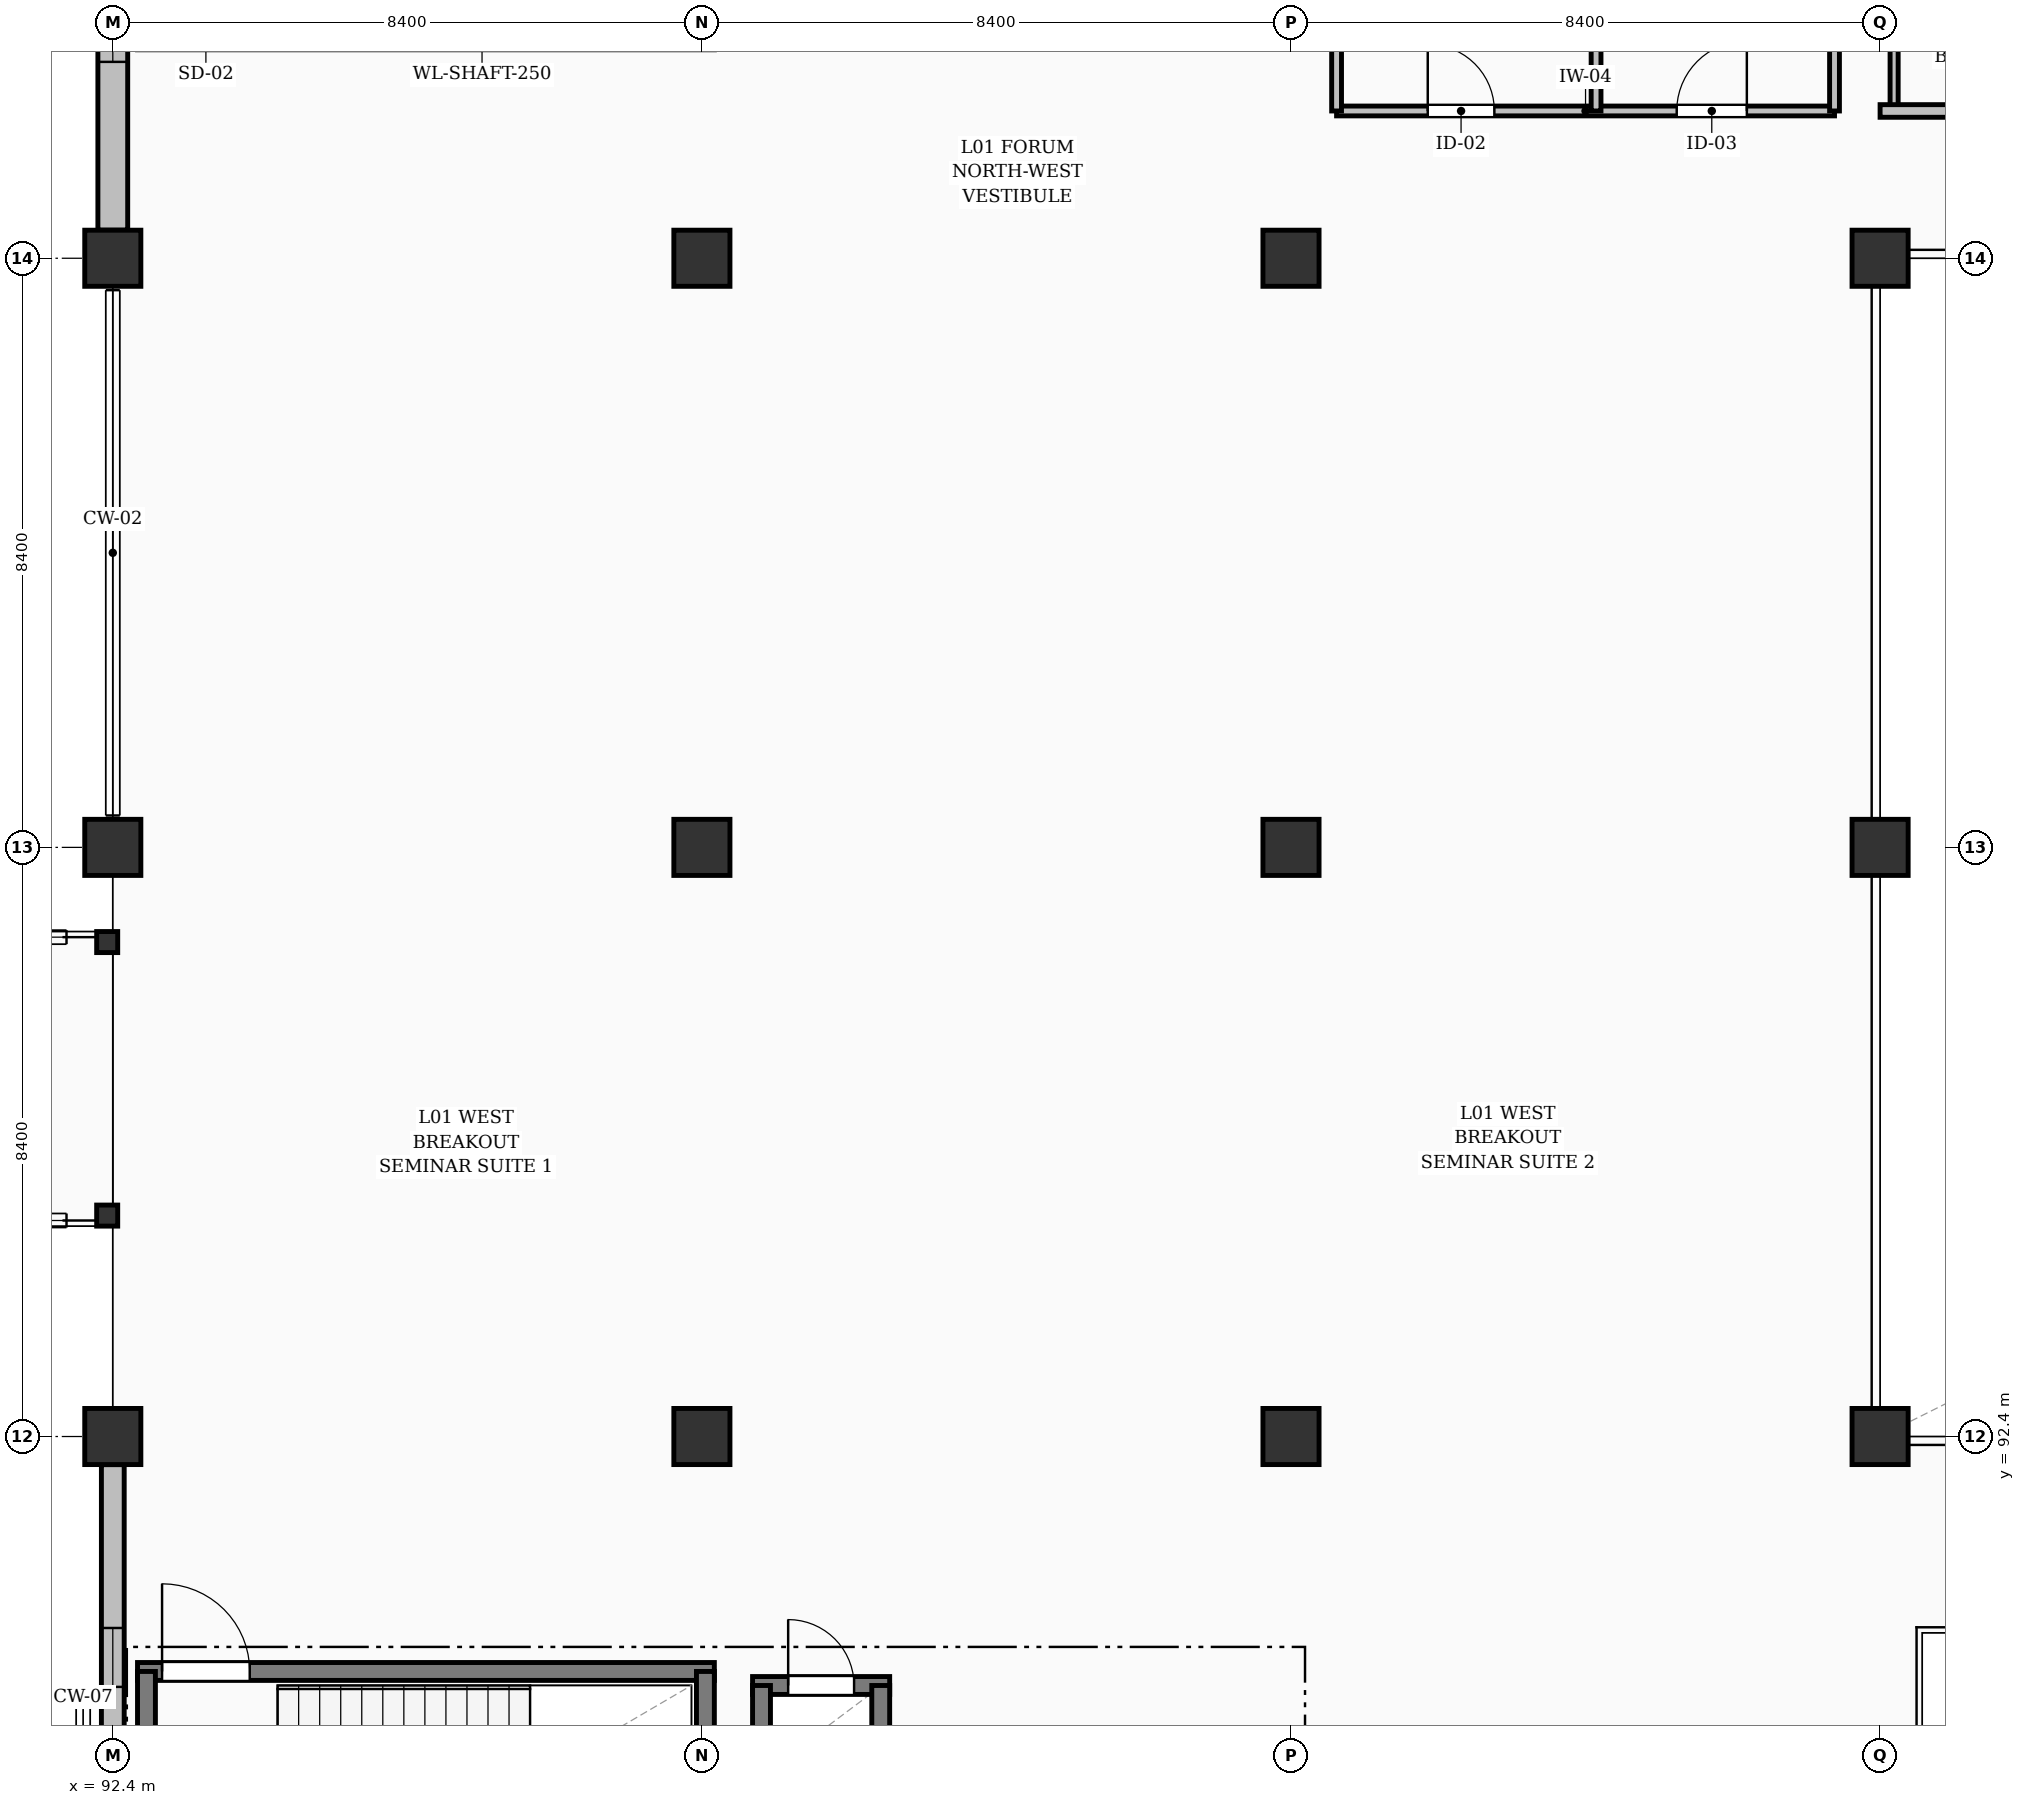
"""IFC4 building model, lengths in metres.
Left out: names, types, materials, properties, quantities, classifications, styles, units other than length and angle.
Written with IfcOpenShell. Run it as: python <this file> out.ifc"""

import sys

from ifc_helpers import new_model, si_unit, direction, frame, frame_2d, origin, origin_2d, place, context, subcontext, project, spatial, rectangle, hollow_rectangle, extrude, element, fill, save


model = new_model("IFC4")
c1 = context("Model", 3, precision=1e-05, world=origin(), true_north=direction((0.0, 1.0)))
c2 = subcontext(c1, "Body", "Model", "MODEL_VIEW")
j1 = project(units=[si_unit("LENGTHUNIT", "METRE"), si_unit("PLANEANGLEUNIT", "RADIAN")], contexts=[c1])
p1 = place(None, origin())
s1 = spatial("IfcSite", under=j1, at=p1, CompositionType="ELEMENT")
p2 = place(p1, origin())
s2 = spatial("IfcBuilding", under=s1, at=p2, CompositionType="ELEMENT")
p3 = place(p2, frame((0.0, 0.0, 3.92)))
s3 = spatial("IfcBuildingStorey", under=s2, at=p3, CompositionType="ELEMENT", Elevation=3.92)
for number, where, z_axis, x_axis in (
    (1, (92.4, 92.4, 0.0), (0.0, 0.0, 1.0), (1.0, 0.0, 0.0)),
    (2, (92.4, 100.8, 0.0), (0.0, 0.0, 1.0), (1.0, 0.0, 0.0)),
    (3, (92.4, 109.2, 0.0), (0.0, 0.0, 1.0), (1.0, 0.0, 0.0)),
    (4, (100.8, 92.4, 0.0), (0.0, 0.0, 1.0), (1.0, 0.0, 0.0)),
    (5, (100.8, 100.8, 0.0), (0.0, 0.0, 1.0), (1.0, 0.0, 0.0)),
    (6, (100.8, 109.2, 0.0), (0.0, 0.0, 1.0), (1.0, 0.0, 0.0)),
    (7, (109.2, 92.4, 0.0), (0.0, 0.0, 1.0), (1.0, 0.0, 0.0)),
    (8, (109.2, 100.8, 0.0), (0.0, 0.0, 1.0), (1.0, 0.0, 0.0)),
    (9, (109.2, 109.2, 0.0), (0.0, 0.0, 1.0), (1.0, 0.0, 0.0)),
    (10, (117.6, 92.4, 0.0), (0.0, 0.0, 1.0), (1.0, 0.0, 0.0)),
    (11, (117.6, 100.8, 0.0), (0.0, 0.0, 1.0), (1.0, 0.0, 0.0)),
    (12, (117.6, 109.2, 0.0), (0.0, 0.0, 1.0), (1.0, 0.0, 0.0)),
):
    element("IfcColumn", number, at=place(p3, frame(where, z_axis=z_axis, x_axis=x_axis)), inside=s3, PredefinedType="COLUMN", context=c2, shape_type="SweptSolid", body=[
        extrude(rectangle(XDim=0.8, YDim=0.8, at=origin_2d()), origin(), (0.0, 0.0, 1.0), 3.64),
    ])
for number, where, z_axis, x_axis in (
    (13, (92.32, 95.55, 0.0), (0.0, 0.0, 1.0), (1.0, 0.0, 0.0)),
    (14, (92.32, 99.45, 0.0), (0.0, 0.0, 1.0), (1.0, 0.0, 0.0)),
):
    element("IfcColumn", number, at=place(p3, frame(where, z_axis=z_axis, x_axis=x_axis)), inside=s3, PredefinedType="COLUMN", context=c2, shape_type="SweptSolid", body=[
        extrude(hollow_rectangle(XDim=0.3, YDim=0.3, WallThickness=0.016, at=origin_2d()), origin(), (0.0, 0.0, 1.0), 3.64),
    ])
p4 = place(p3, frame((92.4, 84.401, 0.0), z_axis=(0.0, 0.0, 1.0), x_axis=(0.0, 1.0, 0.0)))
e15 = element("IfcWall", 15, at=p4, inside=s3, PredefinedType="SOLIDWALL", context=c2, shape_type="SweptSolid", body=[
    extrude(rectangle(XDim=7.598, YDim=0.325, at=frame_2d((3.799, 0.0))), origin(), (0.0, 0.0, 1.0), 2.695),
])
p5 = place(p4, frame((2.329, 0.0, 0.3)))
e16 = element("IfcOpeningElement", 16, at=p5, cuts=e15, PredefinedType="OPENING", context=c2, shape_type="SweptSolid", body=[
    extrude(rectangle(XDim=0.84, YDim=1.85, at=frame_2d((0.42, 0.925))), frame((0.0, 0.172, 0.0), z_axis=(0.0, -1.0, 0.0), x_axis=(1.0, 0.0, 0.0)), (0.0, 0.0, 1.0), 0.345),
])
p6 = place(p4, frame((4.429, 0.0, 0.3)))
e17 = element("IfcOpeningElement", 17, at=p6, cuts=e15, PredefinedType="OPENING", context=c2, shape_type="SweptSolid", body=[
    extrude(rectangle(XDim=0.84, YDim=1.85, at=frame_2d((0.42, 0.925))), frame((0.0, 0.172, 0.0), z_axis=(0.0, -1.0, 0.0), x_axis=(1.0, 0.0, 0.0)), (0.0, 0.0, 1.0), 0.345),
])
p7 = place(p3, frame((92.4, 109.601, 0.0), z_axis=(0.0, 0.0, 1.0), x_axis=(0.0, 1.0, 0.0)))
e18 = element("IfcWall", 18, at=p7, inside=s3, PredefinedType="SOLIDWALL", context=c2, shape_type="SweptSolid", body=[
    extrude(rectangle(XDim=7.598, YDim=0.425, at=frame_2d((3.799, 0.0))), origin(), (0.0, 0.0, 1.0), 2.495),
])
p8 = place(p7, frame((2.399, 0.0, 0.3)))
e19 = element("IfcOpeningElement", 19, at=p8, cuts=e18, PredefinedType="OPENING", context=c2, shape_type="SweptSolid", body=[
    extrude(rectangle(XDim=0.7, YDim=1.9, at=frame_2d((0.35, 0.95))), frame((0.0, 0.223, 0.0), z_axis=(0.0, -1.0, 0.0), x_axis=(1.0, 0.0, 0.0)), (0.0, 0.0, 1.0), 0.445),
])
p9 = place(p7, frame((4.499, 0.0, 0.3)))
e20 = element("IfcOpeningElement", 20, at=p9, cuts=e18, PredefinedType="OPENING", context=c2, shape_type="SweptSolid", body=[
    extrude(rectangle(XDim=0.7, YDim=1.9, at=frame_2d((0.35, 0.95))), frame((0.0, 0.223, 0.0), z_axis=(0.0, -1.0, 0.0), x_axis=(1.0, 0.0, 0.0)), (0.0, 0.0, 1.0), 0.445),
])
p10 = place(p3, frame((92.752, 89.05, 0.0), z_axis=(0.0, 0.0, 1.0), x_axis=(1.0, 0.0, 0.0)))
e21 = element("IfcWall", 21, at=p10, inside=s3, PredefinedType="SOLIDWALL", context=c2, shape_type="SweptSolid", body=[
    extrude(rectangle(XDim=8.225, YDim=0.255, at=frame_2d((4.113, 0.0))), origin(), (0.0, 0.0, 1.0), 3.36),
])
p11 = place(p10, frame((0.35, 0.0, 0.0)))
e22 = element("IfcOpeningElement", 22, at=p11, cuts=e21, PredefinedType="OPENING", context=c2, shape_type="SweptSolid", body=[
    extrude(rectangle(XDim=1.25, YDim=2.2, at=frame_2d((0.625, 1.1))), frame((0.0, 0.137, 0.0), z_axis=(0.0, -1.0, 0.0), x_axis=(1.0, 0.0, 0.0)), (0.0, 0.0, 1.0), 0.275),
])
for number, where, z_axis, x_axis in (
    (23, (92.88, 85.18, 0.0), (0.0, 0.0, 1.0), (0.0, 1.0, 0.0)),
    (24, (100.85, 85.18, 0.0), (0.0, 0.0, 1.0), (0.0, 1.0, 0.0)),
):
    element("IfcWall", number, at=place(p3, frame(where, z_axis=z_axis, x_axis=x_axis)), inside=s3, PredefinedType="SOLIDWALL", context=c2, shape_type="SweptSolid", body=[
        extrude(rectangle(XDim=3.87, YDim=0.255, at=frame_2d((1.935, 0.0))), origin(), (0.0, 0.0, 1.0), 3.36),
    ])
p12 = place(p3, frame((101.522, 88.85, 0.0), z_axis=(0.0, 0.0, 1.0), x_axis=(1.0, 0.0, 0.0)))
e25 = element("IfcWall", 25, at=p12, inside=s3, PredefinedType="SOLIDWALL", context=c2, shape_type="SweptSolid", body=[
    extrude(rectangle(XDim=1.955, YDim=0.255, at=frame_2d((0.978, 0.0))), origin(), (0.0, 0.0, 1.0), 3.36),
])
p13 = place(p12, frame((0.508, 0.0, 0.0)))
e26 = element("IfcOpeningElement", 26, at=p13, cuts=e25, PredefinedType="OPENING", context=c2, shape_type="SweptSolid", body=[
    extrude(rectangle(XDim=0.94, YDim=2.1, at=frame_2d((0.47, 1.05))), frame((0.0, 0.137, 0.0), z_axis=(0.0, -1.0, 0.0), x_axis=(1.0, 0.0, 0.0)), (0.0, 0.0, 1.0), 0.275),
])
for number, where, z_axis, x_axis in (
    (27, (101.65, 87.55, 0.0), (0.0, 0.0, 1.0), (0.0, 1.0, 0.0)),
    (28, (103.35, 87.55, 0.0), (0.0, 0.0, 1.0), (0.0, 1.0, 0.0)),
):
    element("IfcWall", number, at=place(p3, frame(where, z_axis=z_axis, x_axis=x_axis)), inside=s3, PredefinedType="SOLIDWALL", context=c2, shape_type="SweptSolid", body=[
        extrude(rectangle(XDim=1.3, YDim=0.255, at=frame_2d((0.65, 0.0))), origin(), (0.0, 0.0, 1.0), 3.36),
    ])
p14 = place(p3, frame((109.85, 111.3, 0.0), z_axis=(0.0, 0.0, 1.0), x_axis=(1.0, 0.0, 0.0)))
e29 = element("IfcWall", 29, at=p14, inside=s3, PredefinedType="PARTITIONING", context=c2, shape_type="SweptSolid", body=[
    extrude(rectangle(XDim=7.1, YDim=0.14, at=frame_2d((3.55, 0.0))), origin(), (0.0, 0.0, 1.0), 3.36),
])
p15 = place(p14, frame((1.3, 0.0, 0.0)))
e30 = element("IfcOpeningElement", 30, at=p15, cuts=e29, PredefinedType="OPENING", context=c2, shape_type="SweptSolid", body=[
    extrude(rectangle(XDim=0.95, YDim=2.1, at=frame_2d((0.475, 1.05))), frame((0.0, 0.08, 0.0), z_axis=(0.0, -1.0, 0.0), x_axis=(1.0, 0.0, 0.0)), (0.0, 0.0, 1.0), 0.16),
])
p16 = place(p14, frame((4.85, 0.0, 0.0)))
e31 = element("IfcOpeningElement", 31, at=p16, cuts=e29, PredefinedType="OPENING", context=c2, shape_type="SweptSolid", body=[
    extrude(rectangle(XDim=1.0, YDim=2.1, at=frame_2d((0.5, 1.05))), frame((0.0, 0.08, 0.0), z_axis=(0.0, -1.0, 0.0), x_axis=(1.0, 0.0, 0.0)), (0.0, 0.0, 1.0), 0.16),
])
for number, where, z_axis, x_axis in (
    (32, (109.85, 111.3, 0.0), (0.0, 0.0, 1.0), (0.0, 1.0, 0.0)),
    (33, (113.55, 111.3, 0.0), (0.0, 0.0, 1.0), (0.0, 1.0, 0.0)),
    (34, (116.95, 111.3, 0.0), (0.0, 0.0, 1.0), (0.0, 1.0, 0.0)),
):
    element("IfcWall", number, at=place(p3, frame(where, z_axis=z_axis, x_axis=x_axis)), inside=s3, PredefinedType="PARTITIONING", context=c2, shape_type="SweptSolid", body=[
        extrude(rectangle(XDim=6.11, YDim=0.14, at=frame_2d((3.055, 0.0))), origin(), (0.0, 0.0, 1.0), 3.36),
    ])
p17 = place(p3, frame((117.8, 111.3, 0.0), z_axis=(0.0, 0.0, 1.0), x_axis=(0.0, 1.0, 0.0)))
e35 = element("IfcWall", 35, at=p17, inside=s3, PredefinedType="PARTITIONING", context=c2, shape_type="SweptSolid", body=[
    extrude(rectangle(XDim=2.15, YDim=0.115, at=frame_2d((1.075, 0.0))), origin(), (0.0, 0.0, 1.0), 2.595),
])
p18 = place(p3, frame((117.6, 111.3, 0.0), z_axis=(0.0, 0.0, 1.0), x_axis=(1.0, 0.0, 0.0)))
e36 = element("IfcWall", 36, at=p18, inside=s3, PredefinedType="PARTITIONING", context=c2, shape_type="SweptSolid", body=[
    extrude(rectangle(XDim=50.32, YDim=0.18, at=frame_2d((25.16, 0.0))), origin(), (0.0, 0.0, 1.0), 3.36),
])
p19 = place(p18, frame((2.45, 0.0, 0.0)))
e37 = element("IfcOpeningElement", 37, at=p19, cuts=e36, PredefinedType="OPENING", context=c2, shape_type="SweptSolid", body=[
    extrude(rectangle(XDim=0.96, YDim=2.15, at=frame_2d((0.48, 1.075))), frame((0.0, 0.1, 0.0), z_axis=(0.0, -1.0, 0.0), x_axis=(1.0, 0.0, 0.0)), (0.0, 0.0, 1.0), 0.2),
])
p20 = place(p18, frame((6.57, 0.0, 0.0)))
e38 = element("IfcOpeningElement", 38, at=p20, cuts=e36, PredefinedType="OPENING", context=c2, shape_type="SweptSolid", body=[
    extrude(rectangle(XDim=0.96, YDim=2.15, at=frame_2d((0.48, 1.075))), frame((0.0, 0.1, 0.0), z_axis=(0.0, -1.0, 0.0), x_axis=(1.0, 0.0, 0.0)), (0.0, 0.0, 1.0), 0.2),
])
p21 = place(p18, frame((10.69, 0.0, 0.0)))
e39 = element("IfcOpeningElement", 39, at=p21, cuts=e36, PredefinedType="OPENING", context=c2, shape_type="SweptSolid", body=[
    extrude(rectangle(XDim=0.96, YDim=2.15, at=frame_2d((0.48, 1.075))), frame((0.0, 0.1, 0.0), z_axis=(0.0, -1.0, 0.0), x_axis=(1.0, 0.0, 0.0)), (0.0, 0.0, 1.0), 0.2),
])
p22 = place(p18, frame((14.81, 0.0, 0.0)))
e40 = element("IfcOpeningElement", 40, at=p22, cuts=e36, PredefinedType="OPENING", context=c2, shape_type="SweptSolid", body=[
    extrude(rectangle(XDim=0.96, YDim=2.15, at=frame_2d((0.48, 1.075))), frame((0.0, 0.1, 0.0), z_axis=(0.0, -1.0, 0.0), x_axis=(1.0, 0.0, 0.0)), (0.0, 0.0, 1.0), 0.2),
])
p23 = place(p18, frame((18.93, 0.0, 0.0)))
e41 = element("IfcOpeningElement", 41, at=p23, cuts=e36, PredefinedType="OPENING", context=c2, shape_type="SweptSolid", body=[
    extrude(rectangle(XDim=0.96, YDim=2.15, at=frame_2d((0.48, 1.075))), frame((0.0, 0.1, 0.0), z_axis=(0.0, -1.0, 0.0), x_axis=(1.0, 0.0, 0.0)), (0.0, 0.0, 1.0), 0.2),
])
p24 = place(p18, frame((23.05, 0.0, 0.0)))
e42 = element("IfcOpeningElement", 42, at=p24, cuts=e36, PredefinedType="OPENING", context=c2, shape_type="SweptSolid", body=[
    extrude(rectangle(XDim=0.96, YDim=2.15, at=frame_2d((0.48, 1.075))), frame((0.0, 0.1, 0.0), z_axis=(0.0, -1.0, 0.0), x_axis=(1.0, 0.0, 0.0)), (0.0, 0.0, 1.0), 0.2),
])
p25 = place(p18, frame((27.17, 0.0, 0.0)))
e43 = element("IfcOpeningElement", 43, at=p25, cuts=e36, PredefinedType="OPENING", context=c2, shape_type="SweptSolid", body=[
    extrude(rectangle(XDim=0.96, YDim=2.15, at=frame_2d((0.48, 1.075))), frame((0.0, 0.1, 0.0), z_axis=(0.0, -1.0, 0.0), x_axis=(1.0, 0.0, 0.0)), (0.0, 0.0, 1.0), 0.2),
])
p26 = place(p18, frame((31.29, 0.0, 0.0)))
e44 = element("IfcOpeningElement", 44, at=p26, cuts=e36, PredefinedType="OPENING", context=c2, shape_type="SweptSolid", body=[
    extrude(rectangle(XDim=0.96, YDim=2.15, at=frame_2d((0.48, 1.075))), frame((0.0, 0.1, 0.0), z_axis=(0.0, -1.0, 0.0), x_axis=(1.0, 0.0, 0.0)), (0.0, 0.0, 1.0), 0.2),
])
p27 = place(p18, frame((35.41, 0.0, 0.0)))
e45 = element("IfcOpeningElement", 45, at=p27, cuts=e36, PredefinedType="OPENING", context=c2, shape_type="SweptSolid", body=[
    extrude(rectangle(XDim=0.96, YDim=2.15, at=frame_2d((0.48, 1.075))), frame((0.0, 0.1, 0.0), z_axis=(0.0, -1.0, 0.0), x_axis=(1.0, 0.0, 0.0)), (0.0, 0.0, 1.0), 0.2),
])
p28 = place(p18, frame((39.53, 0.0, 0.0)))
e46 = element("IfcOpeningElement", 46, at=p28, cuts=e36, PredefinedType="OPENING", context=c2, shape_type="SweptSolid", body=[
    extrude(rectangle(XDim=0.96, YDim=2.15, at=frame_2d((0.48, 1.075))), frame((0.0, 0.1, 0.0), z_axis=(0.0, -1.0, 0.0), x_axis=(1.0, 0.0, 0.0)), (0.0, 0.0, 1.0), 0.2),
])
p29 = place(p18, frame((43.65, 0.0, 0.0)))
e47 = element("IfcOpeningElement", 47, at=p29, cuts=e36, PredefinedType="OPENING", context=c2, shape_type="SweptSolid", body=[
    extrude(rectangle(XDim=0.96, YDim=2.15, at=frame_2d((0.48, 1.075))), frame((0.0, 0.1, 0.0), z_axis=(0.0, -1.0, 0.0), x_axis=(1.0, 0.0, 0.0)), (0.0, 0.0, 1.0), 0.2),
])
p30 = place(p18, frame((47.77, 0.0, 0.0)))
e48 = element("IfcOpeningElement", 48, at=p30, cuts=e36, PredefinedType="OPENING", context=c2, shape_type="SweptSolid", body=[
    extrude(rectangle(XDim=0.96, YDim=2.15, at=frame_2d((0.48, 1.075))), frame((0.0, 0.1, 0.0), z_axis=(0.0, -1.0, 0.0), x_axis=(1.0, 0.0, 0.0)), (0.0, 0.0, 1.0), 0.2),
])
p31 = place(p6, origin())
e49 = element("IfcWindow", 49, at=p31, inside=s3, PartitioningType="SINGLE_PANEL", PredefinedType="WINDOW", context=c2, shape_type="SweptSolid", body=[
    extrude(rectangle(XDim=0.84, YDim=1.85, at=frame_2d((0.42, 0.925))), frame((0.0, 0.03, 0.0), z_axis=(0.0, -1.0, 0.0), x_axis=(1.0, 0.0, 0.0)), (0.0, 0.0, 1.0), 0.06),
])
fill(e17, e49)
p32 = place(p8, origin())
e50 = element("IfcWindow", 50, at=p32, inside=s3, PartitioningType="SINGLE_PANEL", PredefinedType="WINDOW", context=c2, shape_type="SweptSolid", body=[
    extrude(rectangle(XDim=0.7, YDim=1.9, at=frame_2d((0.35, 0.95))), frame((0.0, 0.03, 0.0), z_axis=(0.0, -1.0, 0.0), x_axis=(1.0, 0.0, 0.0)), (0.0, 0.0, 1.0), 0.06),
])
fill(e19, e50)
p33 = place(p11, origin())
e51 = element("IfcDoor", 51, at=p33, inside=s3, OperationType="SINGLE_SWING_LEFT", PredefinedType="DOOR", context=c2, shape_type="SweptSolid", body=[
    extrude(rectangle(XDim=1.25, YDim=2.2, at=frame_2d((0.625, 1.1))), frame((0.0, 0.025, 0.0), z_axis=(0.0, -1.0, 0.0), x_axis=(1.0, 0.0, 0.0)), (0.0, 0.0, 1.0), 0.05),
])
fill(e22, e51)
p34 = place(p13, origin())
e52 = element("IfcDoor", 52, at=p34, inside=s3, OperationType="SINGLE_SWING_LEFT", PredefinedType="DOOR", context=c2, shape_type="SweptSolid", body=[
    extrude(rectangle(XDim=0.94, YDim=2.1, at=frame_2d((0.47, 1.05))), frame((0.0, 0.025, 0.0), z_axis=(0.0, -1.0, 0.0), x_axis=(1.0, 0.0, 0.0)), (0.0, 0.0, 1.0), 0.05),
])
fill(e26, e52)
p35 = place(p15, origin())
e53 = element("IfcDoor", 53, at=p35, inside=s3, OperationType="SINGLE_SWING_LEFT", PredefinedType="DOOR", context=c2, shape_type="SweptSolid", body=[
    extrude(rectangle(XDim=0.95, YDim=2.1, at=frame_2d((0.475, 1.05))), frame((0.0, 0.025, 0.0), z_axis=(0.0, -1.0, 0.0), x_axis=(1.0, 0.0, 0.0)), (0.0, 0.0, 1.0), 0.05),
])
fill(e30, e53)
p36 = place(p16, origin())
e54 = element("IfcDoor", 54, at=p36, inside=s3, OperationType="SINGLE_SWING_RIGHT", PredefinedType="DOOR", context=c2, shape_type="SweptSolid", body=[
    extrude(rectangle(XDim=1.0, YDim=2.1, at=frame_2d((0.5, 1.05))), frame((0.0, 0.025, 0.0), z_axis=(0.0, -1.0, 0.0), x_axis=(1.0, 0.0, 0.0)), (0.0, 0.0, 1.0), 0.05),
])
fill(e31, e54)
save(model, sys.argv[1])
